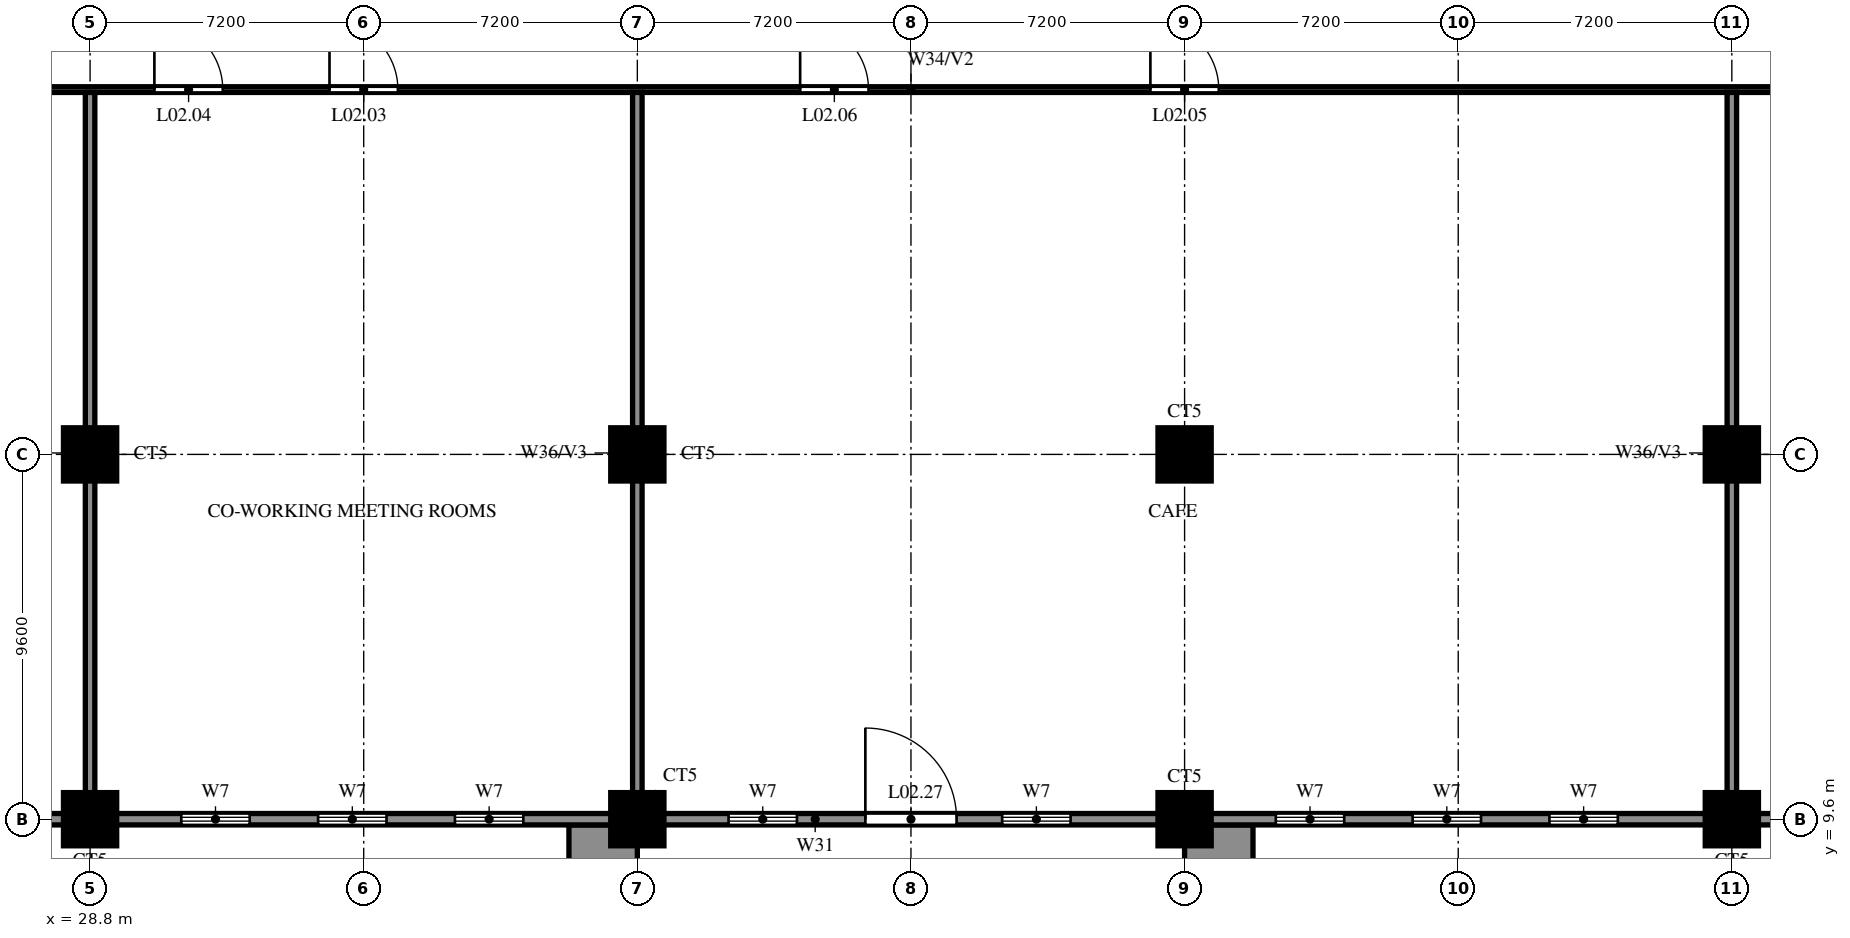
"""IFC4 building model, lengths in metres.
Left out: names, types, materials, properties, quantities, classifications, styles, units other than length and angle.
Written with IfcOpenShell. Run it as: python <this file> out.ifc"""

import sys

from ifc_helpers import new_model, si_unit, direction, frame, frame_2d, origin, origin_2d, place, context, subcontext, project, spatial, rectangle, circle, extrude, source, transform, mapped, element, fill, save


model = new_model("IFC4")
c1 = context("Model", 3, precision=1e-05, world=origin(), true_north=direction((0.0, 1.0)))
c2 = subcontext(c1, "Body", "Model", "MODEL_VIEW")
j1 = project(units=[si_unit("LENGTHUNIT", "METRE"), si_unit("PLANEANGLEUNIT", "RADIAN")], contexts=[c1])
p1 = place(None, origin())
s1 = spatial("IfcSite", under=j1, at=p1, CompositionType="ELEMENT")
p2 = place(p1, origin())
s2 = spatial("IfcBuilding", under=s1, at=p2, CompositionType="ELEMENT")
p3 = place(p2, frame((0.0, 0.0, 13.2)))
s3 = spatial("IfcBuildingStorey", under=s2, at=p3, CompositionType="ELEMENT", Elevation=13.2)
m1 = source(origin(), c2, "Body", "SweptSolid", [
    extrude(circle(Radius=0.7, at=origin_2d()), origin(), (0.0, 0.0, 1.0), 3.8),
])
for number, where, z_axis, x_axis in (
    (1, (28.8, 9.6, 0.0), (0.0, 0.0, 1.0), (1.0, 0.0, 0.0)),
    (2, (43.2, 9.6, 0.0), (0.0, 0.0, 1.0), (1.0, 0.0, 0.0)),
    (3, (57.6, 9.6, 0.0), (0.0, 0.0, 1.0), (1.0, 0.0, 0.0)),
    (4, (72.0, 9.6, 0.0), (0.0, 0.0, 1.0), (1.0, 0.0, 0.0)),
    (5, (28.8, 19.2, 0.0), (0.0, 0.0, 1.0), (1.0, 0.0, 0.0)),
    (6, (43.2, 19.2, 0.0), (0.0, 0.0, 1.0), (1.0, 0.0, 0.0)),
    (7, (57.6, 19.2, 0.0), (0.0, 0.0, 1.0), (1.0, 0.0, 0.0)),
    (8, (72.0, 19.2, 0.0), (0.0, 0.0, 1.0), (1.0, 0.0, 0.0)),
):
    element("IfcColumn", number, at=place(p3, frame(where, z_axis=z_axis, x_axis=x_axis)), inside=s3, PredefinedType="COLUMN", context=c2, shape_type="MappedRepresentation", body=[
        mapped(m1, transform((0.0, 0.0, 0.0))),
    ])
for number, where, z_axis, x_axis in (
    (9, (42.3, -2.55, 0.0), (0.0, 0.0, 1.0), (0.0, 1.0, 0.0)),
    (10, (58.5, -2.55, 0.0), (0.0, 0.0, 1.0), (0.0, 1.0, 0.0)),
):
    element("IfcWall", number, at=place(p3, frame(where, z_axis=z_axis, x_axis=x_axis)), inside=s3, PredefinedType="SOLIDWALL", context=c2, shape_type="SweptSolid", body=[
        extrude(rectangle(XDim=12.0, YDim=1.8, at=frame_2d((6.0, 0.0))), origin(), (0.0, 0.0, 1.0), 4.2),
    ])
p4 = place(p3, frame((0.0, 9.6, 0.0), z_axis=(0.0, 0.0, 1.0), x_axis=(1.0, 0.0, 0.0)))
e11 = element("IfcWall", 11, at=p4, inside=s3, PredefinedType="SOLIDWALL", context=c2, shape_type="SweptSolid", body=[
    extrude(rectangle(XDim=100.8, YDim=0.3, at=frame_2d((50.4, 0.0))), origin(), (0.0, 0.0, 1.0), 3.8),
])
p5 = place(p4, frame((20.7, 0.0, 0.0)))
e12 = element("IfcOpeningElement", 12, at=p5, cuts=e11, PredefinedType="OPENING", context=c2, shape_type="SweptSolid", body=[
    extrude(rectangle(XDim=1.8, YDim=2.1, at=frame_2d((0.9, 1.05))), frame((0.0, 0.16, 0.0), z_axis=(0.0, -1.0, 0.0), x_axis=(1.0, 0.0, 0.0)), (0.0, 0.0, 1.0), 0.32),
])
p6 = place(p4, frame((49.2, 0.0, 0.0)))
e13 = element("IfcOpeningElement", 13, at=p6, cuts=e11, PredefinedType="OPENING", context=c2, shape_type="SweptSolid", body=[
    extrude(rectangle(XDim=2.4, YDim=2.1, at=frame_2d((1.2, 1.05))), frame((0.0, 0.16, 0.0), z_axis=(0.0, -1.0, 0.0), x_axis=(1.0, 0.0, 0.0)), (0.0, 0.0, 1.0), 0.32),
])
p7 = place(p4, frame((78.3, 0.0, 0.0)))
e14 = element("IfcOpeningElement", 14, at=p7, cuts=e11, PredefinedType="OPENING", context=c2, shape_type="SweptSolid", body=[
    extrude(rectangle(XDim=1.8, YDim=2.1, at=frame_2d((0.9, 1.05))), frame((0.0, 0.16, 0.0), z_axis=(0.0, -1.0, 0.0), x_axis=(1.0, 0.0, 0.0)), (0.0, 0.0, 1.0), 0.32),
])
p8 = place(p4, frame((2.4, 0.0, 0.6)))
e15 = element("IfcOpeningElement", 15, at=p8, cuts=e11, PredefinedType="OPENING", context=c2, shape_type="SweptSolid", body=[
    extrude(rectangle(XDim=1.8, YDim=2.4, at=frame_2d((0.9, 1.2))), frame((0.0, 0.16, 0.0), z_axis=(0.0, -1.0, 0.0), x_axis=(1.0, 0.0, 0.0)), (0.0, 0.0, 1.0), 0.32),
])
p9 = place(p4, frame((6.0, 0.0, 0.6)))
e16 = element("IfcOpeningElement", 16, at=p9, cuts=e11, PredefinedType="OPENING", context=c2, shape_type="SweptSolid", body=[
    extrude(rectangle(XDim=1.8, YDim=2.4, at=frame_2d((0.9, 1.2))), frame((0.0, 0.16, 0.0), z_axis=(0.0, -1.0, 0.0), x_axis=(1.0, 0.0, 0.0)), (0.0, 0.0, 1.0), 0.32),
])
p10 = place(p4, frame((9.6, 0.0, 0.6)))
e17 = element("IfcOpeningElement", 17, at=p10, cuts=e11, PredefinedType="OPENING", context=c2, shape_type="SweptSolid", body=[
    extrude(rectangle(XDim=1.8, YDim=2.4, at=frame_2d((0.9, 1.2))), frame((0.0, 0.16, 0.0), z_axis=(0.0, -1.0, 0.0), x_axis=(1.0, 0.0, 0.0)), (0.0, 0.0, 1.0), 0.32),
])
p11 = place(p4, frame((16.8, 0.0, 0.6)))
e18 = element("IfcOpeningElement", 18, at=p11, cuts=e11, PredefinedType="OPENING", context=c2, shape_type="SweptSolid", body=[
    extrude(rectangle(XDim=1.8, YDim=2.4, at=frame_2d((0.9, 1.2))), frame((0.0, 0.16, 0.0), z_axis=(0.0, -1.0, 0.0), x_axis=(1.0, 0.0, 0.0)), (0.0, 0.0, 1.0), 0.32),
])
p12 = place(p4, frame((24.0, 0.0, 0.6)))
e19 = element("IfcOpeningElement", 19, at=p12, cuts=e11, PredefinedType="OPENING", context=c2, shape_type="SweptSolid", body=[
    extrude(rectangle(XDim=1.8, YDim=2.4, at=frame_2d((0.9, 1.2))), frame((0.0, 0.16, 0.0), z_axis=(0.0, -1.0, 0.0), x_axis=(1.0, 0.0, 0.0)), (0.0, 0.0, 1.0), 0.32),
])
p13 = place(p4, frame((31.2, 0.0, 0.6)))
e20 = element("IfcOpeningElement", 20, at=p13, cuts=e11, PredefinedType="OPENING", context=c2, shape_type="SweptSolid", body=[
    extrude(rectangle(XDim=1.8, YDim=2.4, at=frame_2d((0.9, 1.2))), frame((0.0, 0.16, 0.0), z_axis=(0.0, -1.0, 0.0), x_axis=(1.0, 0.0, 0.0)), (0.0, 0.0, 1.0), 0.32),
])
p14 = place(p4, frame((34.8, 0.0, 0.6)))
e21 = element("IfcOpeningElement", 21, at=p14, cuts=e11, PredefinedType="OPENING", context=c2, shape_type="SweptSolid", body=[
    extrude(rectangle(XDim=1.8, YDim=2.4, at=frame_2d((0.9, 1.2))), frame((0.0, 0.16, 0.0), z_axis=(0.0, -1.0, 0.0), x_axis=(1.0, 0.0, 0.0)), (0.0, 0.0, 1.0), 0.32),
])
p15 = place(p4, frame((38.4, 0.0, 0.6)))
e22 = element("IfcOpeningElement", 22, at=p15, cuts=e11, PredefinedType="OPENING", context=c2, shape_type="SweptSolid", body=[
    extrude(rectangle(XDim=1.8, YDim=2.4, at=frame_2d((0.9, 1.2))), frame((0.0, 0.16, 0.0), z_axis=(0.0, -1.0, 0.0), x_axis=(1.0, 0.0, 0.0)), (0.0, 0.0, 1.0), 0.32),
])
p16 = place(p4, frame((45.6, 0.0, 0.6)))
e23 = element("IfcOpeningElement", 23, at=p16, cuts=e11, PredefinedType="OPENING", context=c2, shape_type="SweptSolid", body=[
    extrude(rectangle(XDim=1.8, YDim=2.4, at=frame_2d((0.9, 1.2))), frame((0.0, 0.16, 0.0), z_axis=(0.0, -1.0, 0.0), x_axis=(1.0, 0.0, 0.0)), (0.0, 0.0, 1.0), 0.32),
])
p17 = place(p4, frame((52.8, 0.0, 0.6)))
e24 = element("IfcOpeningElement", 24, at=p17, cuts=e11, PredefinedType="OPENING", context=c2, shape_type="SweptSolid", body=[
    extrude(rectangle(XDim=1.8, YDim=2.4, at=frame_2d((0.9, 1.2))), frame((0.0, 0.16, 0.0), z_axis=(0.0, -1.0, 0.0), x_axis=(1.0, 0.0, 0.0)), (0.0, 0.0, 1.0), 0.32),
])
p18 = place(p4, frame((60.0, 0.0, 0.6)))
e25 = element("IfcOpeningElement", 25, at=p18, cuts=e11, PredefinedType="OPENING", context=c2, shape_type="SweptSolid", body=[
    extrude(rectangle(XDim=1.8, YDim=2.4, at=frame_2d((0.9, 1.2))), frame((0.0, 0.16, 0.0), z_axis=(0.0, -1.0, 0.0), x_axis=(1.0, 0.0, 0.0)), (0.0, 0.0, 1.0), 0.32),
])
p19 = place(p4, frame((63.6, 0.0, 0.6)))
e26 = element("IfcOpeningElement", 26, at=p19, cuts=e11, PredefinedType="OPENING", context=c2, shape_type="SweptSolid", body=[
    extrude(rectangle(XDim=1.8, YDim=2.4, at=frame_2d((0.9, 1.2))), frame((0.0, 0.16, 0.0), z_axis=(0.0, -1.0, 0.0), x_axis=(1.0, 0.0, 0.0)), (0.0, 0.0, 1.0), 0.32),
])
p20 = place(p4, frame((67.2, 0.0, 0.6)))
e27 = element("IfcOpeningElement", 27, at=p20, cuts=e11, PredefinedType="OPENING", context=c2, shape_type="SweptSolid", body=[
    extrude(rectangle(XDim=1.8, YDim=2.4, at=frame_2d((0.9, 1.2))), frame((0.0, 0.16, 0.0), z_axis=(0.0, -1.0, 0.0), x_axis=(1.0, 0.0, 0.0)), (0.0, 0.0, 1.0), 0.32),
])
p21 = place(p4, frame((74.4, 0.0, 0.6)))
e28 = element("IfcOpeningElement", 28, at=p21, cuts=e11, PredefinedType="OPENING", context=c2, shape_type="SweptSolid", body=[
    extrude(rectangle(XDim=1.8, YDim=2.4, at=frame_2d((0.9, 1.2))), frame((0.0, 0.16, 0.0), z_axis=(0.0, -1.0, 0.0), x_axis=(1.0, 0.0, 0.0)), (0.0, 0.0, 1.0), 0.32),
])
p22 = place(p4, frame((81.6, 0.0, 0.6)))
e29 = element("IfcOpeningElement", 29, at=p22, cuts=e11, PredefinedType="OPENING", context=c2, shape_type="SweptSolid", body=[
    extrude(rectangle(XDim=1.8, YDim=2.4, at=frame_2d((0.9, 1.2))), frame((0.0, 0.16, 0.0), z_axis=(0.0, -1.0, 0.0), x_axis=(1.0, 0.0, 0.0)), (0.0, 0.0, 1.0), 0.32),
])
p23 = place(p4, frame((88.8, 0.0, 0.6)))
e30 = element("IfcOpeningElement", 30, at=p23, cuts=e11, PredefinedType="OPENING", context=c2, shape_type="SweptSolid", body=[
    extrude(rectangle(XDim=1.8, YDim=2.4, at=frame_2d((0.9, 1.2))), frame((0.0, 0.16, 0.0), z_axis=(0.0, -1.0, 0.0), x_axis=(1.0, 0.0, 0.0)), (0.0, 0.0, 1.0), 0.32),
])
p24 = place(p4, frame((92.4, 0.0, 0.6)))
e31 = element("IfcOpeningElement", 31, at=p24, cuts=e11, PredefinedType="OPENING", context=c2, shape_type="SweptSolid", body=[
    extrude(rectangle(XDim=1.8, YDim=2.4, at=frame_2d((0.9, 1.2))), frame((0.0, 0.16, 0.0), z_axis=(0.0, -1.0, 0.0), x_axis=(1.0, 0.0, 0.0)), (0.0, 0.0, 1.0), 0.32),
])
p25 = place(p4, frame((96.0, 0.0, 0.6)))
e32 = element("IfcOpeningElement", 32, at=p25, cuts=e11, PredefinedType="OPENING", context=c2, shape_type="SweptSolid", body=[
    extrude(rectangle(XDim=1.8, YDim=2.4, at=frame_2d((0.9, 1.2))), frame((0.0, 0.16, 0.0), z_axis=(0.0, -1.0, 0.0), x_axis=(1.0, 0.0, 0.0)), (0.0, 0.0, 1.0), 0.32),
])
p26 = place(p3, frame((0.15, 28.8, 0.0), z_axis=(0.0, 0.0, 1.0), x_axis=(1.0, 0.0, 0.0)))
e33 = element("IfcWall", 33, at=p26, inside=s3, PredefinedType="PARTITIONING", context=c2, shape_type="SweptSolid", body=[
    extrude(rectangle(XDim=100.5, YDim=0.15, at=frame_2d((50.25, 0.0))), origin(), (0.0, 0.0, 1.0), 2.6),
])
p27 = place(p26, frame((13.35, 0.0, 0.0)))
e34 = element("IfcOpeningElement", 34, at=p27, cuts=e33, PredefinedType="OPENING", context=c2, shape_type="SweptSolid", body=[
    extrude(rectangle(XDim=1.8, YDim=2.1, at=frame_2d((0.9, 1.05))), frame((0.0, 0.085, 0.0), z_axis=(0.0, -1.0, 0.0), x_axis=(1.0, 0.0, 0.0)), (0.0, 0.0, 1.0), 0.17),
])
p28 = place(p26, frame((4.134, 0.0, 0.0)))
e35 = element("IfcOpeningElement", 35, at=p28, cuts=e33, PredefinedType="OPENING", context=c2, shape_type="SweptSolid", body=[
    extrude(rectangle(XDim=1.8, YDim=2.1, at=frame_2d((0.9, 1.05))), frame((0.0, 0.085, 0.0), z_axis=(0.0, -1.0, 0.0), x_axis=(1.0, 0.0, 0.0)), (0.0, 0.0, 1.0), 0.17),
])
p29 = place(p26, frame((34.95, 0.0, 0.0)))
e36 = element("IfcOpeningElement", 36, at=p29, cuts=e33, PredefinedType="OPENING", context=c2, shape_type="SweptSolid", body=[
    extrude(rectangle(XDim=1.8, YDim=2.1, at=frame_2d((0.9, 1.05))), frame((0.0, 0.085, 0.0), z_axis=(0.0, -1.0, 0.0), x_axis=(1.0, 0.0, 0.0)), (0.0, 0.0, 1.0), 0.17),
])
p30 = place(p26, frame((30.342, 0.0, 0.0)))
e37 = element("IfcOpeningElement", 37, at=p30, cuts=e33, PredefinedType="OPENING", context=c2, shape_type="SweptSolid", body=[
    extrude(rectangle(XDim=1.8, YDim=2.1, at=frame_2d((0.9, 1.05))), frame((0.0, 0.085, 0.0), z_axis=(0.0, -1.0, 0.0), x_axis=(1.0, 0.0, 0.0)), (0.0, 0.0, 1.0), 0.17),
])
p31 = place(p26, frame((56.55, 0.0, 0.0)))
e38 = element("IfcOpeningElement", 38, at=p31, cuts=e33, PredefinedType="OPENING", context=c2, shape_type="SweptSolid", body=[
    extrude(rectangle(XDim=1.8, YDim=2.1, at=frame_2d((0.9, 1.05))), frame((0.0, 0.085, 0.0), z_axis=(0.0, -1.0, 0.0), x_axis=(1.0, 0.0, 0.0)), (0.0, 0.0, 1.0), 0.17),
])
p32 = place(p26, frame((47.334, 0.0, 0.0)))
e39 = element("IfcOpeningElement", 39, at=p32, cuts=e33, PredefinedType="OPENING", context=c2, shape_type="SweptSolid", body=[
    extrude(rectangle(XDim=1.8, YDim=2.1, at=frame_2d((0.9, 1.05))), frame((0.0, 0.085, 0.0), z_axis=(0.0, -1.0, 0.0), x_axis=(1.0, 0.0, 0.0)), (0.0, 0.0, 1.0), 0.17),
])
p33 = place(p26, frame((85.35, 0.0, 0.0)))
e40 = element("IfcOpeningElement", 40, at=p33, cuts=e33, PredefinedType="OPENING", context=c2, shape_type="SweptSolid", body=[
    extrude(rectangle(XDim=1.8, YDim=2.1, at=frame_2d((0.9, 1.05))), frame((0.0, 0.085, 0.0), z_axis=(0.0, -1.0, 0.0), x_axis=(1.0, 0.0, 0.0)), (0.0, 0.0, 1.0), 0.17),
])
p34 = place(p26, frame((76.134, 0.0, 0.0)))
e41 = element("IfcOpeningElement", 41, at=p34, cuts=e33, PredefinedType="OPENING", context=c2, shape_type="SweptSolid", body=[
    extrude(rectangle(XDim=1.8, YDim=2.1, at=frame_2d((0.9, 1.05))), frame((0.0, 0.085, 0.0), z_axis=(0.0, -1.0, 0.0), x_axis=(1.0, 0.0, 0.0)), (0.0, 0.0, 1.0), 0.17),
])
for number, where, z_axis, x_axis in (
    (42, (28.8, 9.75, 0.0), (0.0, 0.0, 1.0), (0.0, 1.0, 0.0)),
    (43, (43.2, 9.75, 0.0), (0.0, 0.0, 1.0), (0.0, 1.0, 0.0)),
    (44, (72.0, 9.75, 0.0), (0.0, 0.0, 1.0), (0.0, 1.0, 0.0)),
):
    element("IfcWall", number, at=place(p3, frame(where, z_axis=z_axis, x_axis=x_axis)), inside=s3, PredefinedType="SOLIDWALL", context=c2, shape_type="SweptSolid", body=[
        extrude(rectangle(XDim=18.975, YDim=0.25, at=frame_2d((9.488, 0.0))), origin(), (0.0, 0.0, 1.0), 2.6),
    ])
p35 = place(p29, origin())
e45 = element("IfcDoor", 45, at=p35, inside=s3, OperationType="DOUBLE_DOOR_SINGLE_SWING", PredefinedType="DOOR", context=c2, shape_type="SweptSolid", body=[
    extrude(rectangle(XDim=1.8, YDim=2.1, at=frame_2d((0.9, 1.05))), frame((0.0, 0.025, 0.0), z_axis=(0.0, -1.0, 0.0), x_axis=(1.0, 0.0, 0.0)), (0.0, 0.0, 1.0), 0.05),
])
fill(e36, e45)
p36 = place(p30, origin())
e46 = element("IfcDoor", 46, at=p36, inside=s3, OperationType="DOUBLE_DOOR_SINGLE_SWING", PredefinedType="DOOR", context=c2, shape_type="SweptSolid", body=[
    extrude(rectangle(XDim=1.8, YDim=2.1, at=frame_2d((0.9, 1.05))), frame((0.0, 0.025, 0.0), z_axis=(0.0, -1.0, 0.0), x_axis=(1.0, 0.0, 0.0)), (0.0, 0.0, 1.0), 0.05),
])
fill(e37, e46)
p37 = place(p31, origin())
e47 = element("IfcDoor", 47, at=p37, inside=s3, OperationType="DOUBLE_DOOR_SINGLE_SWING", PredefinedType="DOOR", context=c2, shape_type="SweptSolid", body=[
    extrude(rectangle(XDim=1.8, YDim=2.1, at=frame_2d((0.9, 1.05))), frame((0.0, 0.025, 0.0), z_axis=(0.0, -1.0, 0.0), x_axis=(1.0, 0.0, 0.0)), (0.0, 0.0, 1.0), 0.05),
])
fill(e38, e47)
p38 = place(p32, origin())
e48 = element("IfcDoor", 48, at=p38, inside=s3, OperationType="DOUBLE_DOOR_SINGLE_SWING", PredefinedType="DOOR", context=c2, shape_type="SweptSolid", body=[
    extrude(rectangle(XDim=1.8, YDim=2.1, at=frame_2d((0.9, 1.05))), frame((0.0, 0.025, 0.0), z_axis=(0.0, -1.0, 0.0), x_axis=(1.0, 0.0, 0.0)), (0.0, 0.0, 1.0), 0.05),
])
fill(e39, e48)
p39 = place(p6, origin())
e49 = element("IfcDoor", 49, at=p39, inside=s3, OperationType="DOUBLE_DOOR_SINGLE_SWING", PredefinedType="DOOR", context=c2, shape_type="SweptSolid", body=[
    extrude(rectangle(XDim=2.4, YDim=2.1, at=frame_2d((1.2, 1.05))), frame((0.0, 0.025, 0.0), z_axis=(0.0, -1.0, 0.0), x_axis=(1.0, 0.0, 0.0)), (0.0, 0.0, 1.0), 0.05),
])
fill(e13, e49)
p40 = place(p13, origin())
e50 = element("IfcWindow", 50, at=p40, inside=s3, PartitioningType="DOUBLE_PANEL_VERTICAL", PredefinedType="WINDOW", context=c2, shape_type="SweptSolid", body=[
    extrude(rectangle(XDim=1.8, YDim=2.4, at=frame_2d((0.9, 1.2))), frame((0.0, 0.03, 0.0), z_axis=(0.0, -1.0, 0.0), x_axis=(1.0, 0.0, 0.0)), (0.0, 0.0, 1.0), 0.06),
])
fill(e20, e50)
p41 = place(p14, origin())
e51 = element("IfcWindow", 51, at=p41, inside=s3, PartitioningType="DOUBLE_PANEL_VERTICAL", PredefinedType="WINDOW", context=c2, shape_type="SweptSolid", body=[
    extrude(rectangle(XDim=1.8, YDim=2.4, at=frame_2d((0.9, 1.2))), frame((0.0, 0.03, 0.0), z_axis=(0.0, -1.0, 0.0), x_axis=(1.0, 0.0, 0.0)), (0.0, 0.0, 1.0), 0.06),
])
fill(e21, e51)
p42 = place(p15, origin())
e52 = element("IfcWindow", 52, at=p42, inside=s3, PartitioningType="DOUBLE_PANEL_VERTICAL", PredefinedType="WINDOW", context=c2, shape_type="SweptSolid", body=[
    extrude(rectangle(XDim=1.8, YDim=2.4, at=frame_2d((0.9, 1.2))), frame((0.0, 0.03, 0.0), z_axis=(0.0, -1.0, 0.0), x_axis=(1.0, 0.0, 0.0)), (0.0, 0.0, 1.0), 0.06),
])
fill(e22, e52)
p43 = place(p16, origin())
e53 = element("IfcWindow", 53, at=p43, inside=s3, PartitioningType="DOUBLE_PANEL_VERTICAL", PredefinedType="WINDOW", context=c2, shape_type="SweptSolid", body=[
    extrude(rectangle(XDim=1.8, YDim=2.4, at=frame_2d((0.9, 1.2))), frame((0.0, 0.03, 0.0), z_axis=(0.0, -1.0, 0.0), x_axis=(1.0, 0.0, 0.0)), (0.0, 0.0, 1.0), 0.06),
])
fill(e23, e53)
p44 = place(p17, origin())
e54 = element("IfcWindow", 54, at=p44, inside=s3, PartitioningType="DOUBLE_PANEL_VERTICAL", PredefinedType="WINDOW", context=c2, shape_type="SweptSolid", body=[
    extrude(rectangle(XDim=1.8, YDim=2.4, at=frame_2d((0.9, 1.2))), frame((0.0, 0.03, 0.0), z_axis=(0.0, -1.0, 0.0), x_axis=(1.0, 0.0, 0.0)), (0.0, 0.0, 1.0), 0.06),
])
fill(e24, e54)
p45 = place(p18, origin())
e55 = element("IfcWindow", 55, at=p45, inside=s3, PartitioningType="DOUBLE_PANEL_VERTICAL", PredefinedType="WINDOW", context=c2, shape_type="SweptSolid", body=[
    extrude(rectangle(XDim=1.8, YDim=2.4, at=frame_2d((0.9, 1.2))), frame((0.0, 0.03, 0.0), z_axis=(0.0, -1.0, 0.0), x_axis=(1.0, 0.0, 0.0)), (0.0, 0.0, 1.0), 0.06),
])
fill(e25, e55)
p46 = place(p19, origin())
e56 = element("IfcWindow", 56, at=p46, inside=s3, PartitioningType="DOUBLE_PANEL_VERTICAL", PredefinedType="WINDOW", context=c2, shape_type="SweptSolid", body=[
    extrude(rectangle(XDim=1.8, YDim=2.4, at=frame_2d((0.9, 1.2))), frame((0.0, 0.03, 0.0), z_axis=(0.0, -1.0, 0.0), x_axis=(1.0, 0.0, 0.0)), (0.0, 0.0, 1.0), 0.06),
])
fill(e26, e56)
p47 = place(p20, origin())
e57 = element("IfcWindow", 57, at=p47, inside=s3, PartitioningType="DOUBLE_PANEL_VERTICAL", PredefinedType="WINDOW", context=c2, shape_type="SweptSolid", body=[
    extrude(rectangle(XDim=1.8, YDim=2.4, at=frame_2d((0.9, 1.2))), frame((0.0, 0.03, 0.0), z_axis=(0.0, -1.0, 0.0), x_axis=(1.0, 0.0, 0.0)), (0.0, 0.0, 1.0), 0.06),
])
fill(e27, e57)
save(model, sys.argv[1])
